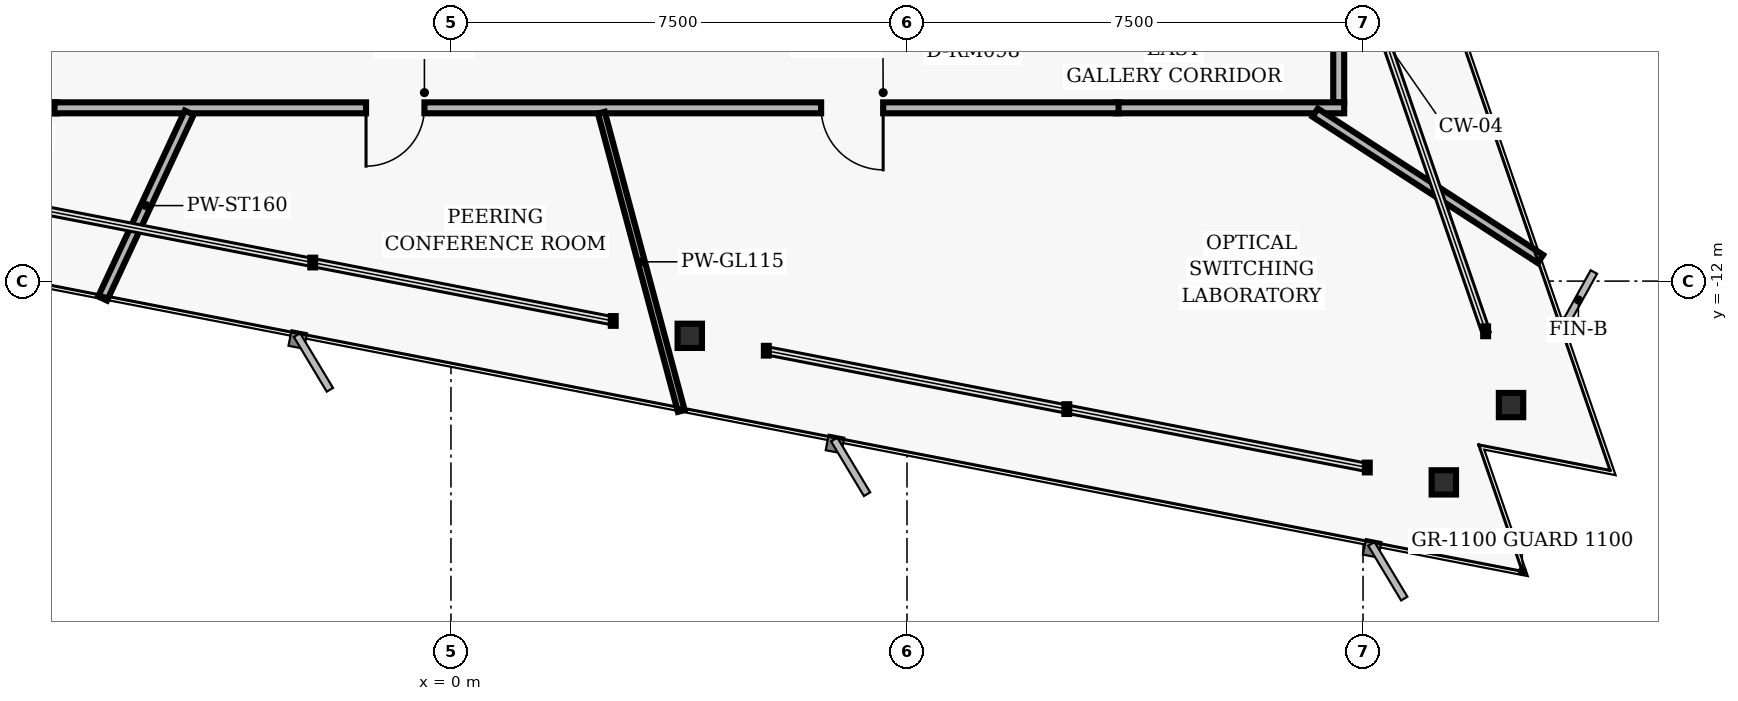
"""IFC4 building model, lengths in metres.
Left out: names, types, materials, properties, quantities, classifications, styles, units other than length and angle.
Written with IfcOpenShell. Run it as: python <this file> out.ifc"""

import sys

from ifc_helpers import new_model, si_unit, direction, frame, frame_2d, origin, origin_2d, place, context, subcontext, project, spatial, rectangle, i_section, extrude, element, fill, save


model = new_model("IFC4")
c1 = context("Model", 3, precision=1e-05, world=origin(), true_north=direction((0.0, 1.0)))
c2 = subcontext(c1, "Body", "Model", "MODEL_VIEW")
j1 = project(units=[si_unit("LENGTHUNIT", "METRE"), si_unit("PLANEANGLEUNIT", "RADIAN")], contexts=[c1])
p1 = place(None, origin())
s1 = spatial("IfcSite", under=j1, at=p1, CompositionType="ELEMENT")
p2 = place(p1, origin())
s2 = spatial("IfcBuilding", under=s1, at=p2, CompositionType="ELEMENT")
p3 = place(p2, frame((0.0, 0.0, 156.32)))
s3 = spatial("IfcBuildingStorey", under=s2, at=p3, CompositionType="ELEMENT", Elevation=156.32)
for number, where, z_axis, x_axis in (
    (1, (17.434, -14.039, 0.0), (0.0, 0.0, 1.0), (1.0, 0.0, 0.0)),
    (2, (3.927, -12.9, 0.0), (0.0, 0.0, 1.0), (1.0, 0.0, 0.0)),
    (3, (16.329, -15.311, 0.0), (0.0, 0.0, 1.0), (1.0, 0.0, 0.0)),
):
    element("IfcColumn", number, at=place(p3, frame(where, z_axis=z_axis, x_axis=x_axis)), inside=s3, PredefinedType="COLUMN", context=c2, shape_type="SweptSolid", body=[
        extrude(i_section(OverallWidth=0.401, OverallDepth=0.399, WebThickness=0.025, FlangeThickness=0.04, FilletRadius=0.018, at=origin_2d()), origin(), (0.0, 0.0, 1.0), 3.04),
    ])
p4 = place(p3, frame((-6.48, -9.15, 0.0), z_axis=(0.0, 0.0, 1.0), x_axis=(-1.0, 0.0, 0.0)))
e4 = element("IfcWall", 4, at=p4, inside=s3, PredefinedType="PARTITIONING", context=c2, shape_type="SweptSolid", body=[
    extrude(rectangle(XDim=1.86, YDim=0.18, at=frame_2d((0.93, 0.0))), origin(), (0.0, 0.0, 1.0), 2.33),
])
p5 = place(p3, frame((14.6, -7.18, 0.0), z_axis=(0.0, 0.0, 1.0), x_axis=(0.0, -1.0, 0.0)))
e5 = element("IfcWall", 5, at=p5, inside=s3, PredefinedType="PARTITIONING", context=c2, shape_type="SweptSolid", body=[
    extrude(rectangle(XDim=1.88, YDim=0.18, at=frame_2d((0.94, 0.0))), origin(), (0.0, 0.0, 1.0), 2.763),
])
p6 = place(p3, frame((14.69, -9.15, 0.0), z_axis=(0.0, 0.0, 1.0), x_axis=(-1.0, 0.0, 0.0)))
e6 = element("IfcWall", 6, at=p6, inside=s3, PredefinedType="PARTITIONING", context=c2, shape_type="SweptSolid", body=[
    extrude(rectangle(XDim=3.75, YDim=0.18, at=frame_2d((1.875, 0.0))), origin(), (0.0, 0.0, 1.0), 2.763),
])
p7 = place(p3, frame((10.98, -9.15, 0.0), z_axis=(0.0, 0.0, 1.0), x_axis=(-1.0, 0.0, 0.0)))
e7 = element("IfcWall", 7, at=p7, inside=s3, PredefinedType="PARTITIONING", context=c2, shape_type="SweptSolid", body=[
    extrude(rectangle(XDim=17.5, YDim=0.18, at=frame_2d((8.75, 0.0))), origin(), (0.0, 0.0, 1.0), 2.33),
])
p8 = place(p7, frame((11.417, 0.0, 0.0)))
e8 = element("IfcOpeningElement", 8, at=p8, cuts=e7, PredefinedType="OPENING", context=c2, shape_type="SweptSolid", body=[
    extrude(rectangle(XDim=0.96, YDim=2.02, at=frame_2d((0.48, 1.01))), frame((0.0, 0.1, 0.0), z_axis=(0.0, -1.0, 0.0), x_axis=(1.0, 0.0, 0.0)), (0.0, 0.0, 1.0), 0.2),
])
p9 = place(p7, frame((3.872, 0.0, 0.0)))
e9 = element("IfcOpeningElement", 9, at=p9, cuts=e7, PredefinedType="OPENING", context=c2, shape_type="SweptSolid", body=[
    extrude(rectangle(XDim=1.02, YDim=2.02, at=frame_2d((0.51, 1.01))), frame((0.0, 0.1, 0.0), z_axis=(0.0, -1.0, 0.0), x_axis=(1.0, 0.0, 0.0)), (0.0, 0.0, 1.0), 0.2),
])
p10 = place(p3, frame((-4.304, -9.23, 0.0), z_axis=(0.0, 0.0, 1.0), x_axis=(-0.422604032696, -0.906314422013, 0.0)))
e10 = element("IfcWall", 10, at=p10, inside=s3, PredefinedType="PARTITIONING", context=c2, shape_type="SweptSolid", body=[
    extrude(rectangle(XDim=3.372, YDim=0.16, at=frame_2d((1.686, 0.0))), origin(), (0.0, 0.0, 1.0), 2.763),
])
p11 = place(p3, frame((2.473, -9.23, 0.0), z_axis=(0.0, 0.0, 1.0), x_axis=(0.258799355676, -0.96593110184, 0.0)))
e11 = element("IfcWall", 11, at=p11, inside=s3, PredefinedType="MOVABLE", context=c2, shape_type="SweptSolid", body=[
    extrude(rectangle(XDim=5.079, YDim=0.115, at=frame_2d((2.54, 0.0))), origin(), (0.0, 0.0, 1.0), 2.763),
])
p12 = place(p3, frame((14.213, -9.23, 0.0), z_axis=(0.0, 0.0, 1.0), x_axis=(0.83867205822, -0.544636740187, 0.0)))
e12 = element("IfcWall", 12, at=p12, inside=s3, PredefinedType="PARTITIONING", context=c2, shape_type="SweptSolid", body=[
    extrude(rectangle(XDim=4.418, YDim=0.16, at=frame_2d((2.209, 0.0))), origin(), (0.0, 0.0, 1.0), 2.763),
])
p13 = place(p8, origin())
e13 = element("IfcDoor", 13, at=p13, inside=s3, OperationType="SINGLE_SWING_RIGHT", PredefinedType="DOOR", context=c2, shape_type="SweptSolid", body=[
    extrude(rectangle(XDim=0.96, YDim=2.02, at=frame_2d((0.48, 1.01))), frame((0.0, 0.025, 0.0), z_axis=(0.0, -1.0, 0.0), x_axis=(1.0, 0.0, 0.0)), (0.0, 0.0, 1.0), 0.05),
])
fill(e8, e13)
p14 = place(p9, origin())
e14 = element("IfcDoor", 14, at=p14, inside=s3, OperationType="SINGLE_SWING_LEFT", PredefinedType="DOOR", context=c2, shape_type="SweptSolid", body=[
    extrude(rectangle(XDim=1.02, YDim=2.02, at=frame_2d((0.51, 1.01))), frame((0.0, 0.025, 0.0), z_axis=(0.0, -1.0, 0.0), x_axis=(1.0, 0.0, 0.0)), (0.0, 0.0, 1.0), 0.05),
])
fill(e9, e14)
save(model, sys.argv[1])
